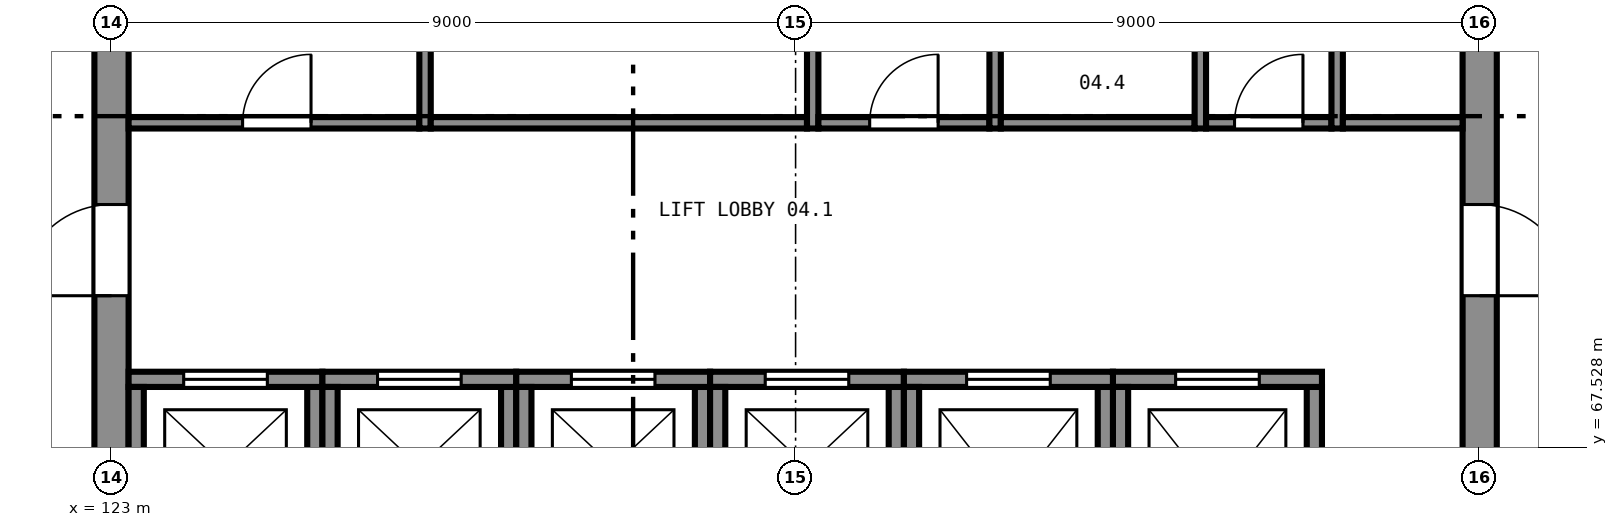
"""IFC4 building model, lengths in metres.
Left out: names, types, materials, properties, quantities, classifications, styles, units other than length and angle.
Written with IfcOpenShell. Run it as: python <this file> out.ifc"""

import sys

from ifc_helpers import new_model, si_unit, direction, frame, frame_2d, origin, place, context, subcontext, project, spatial, rectangle, extrude, element, fill, save


model = new_model("IFC4")
c1 = context("Model", 3, precision=1e-05, world=origin(), true_north=direction((0.0, 1.0)))
c2 = subcontext(c1, "Body", "Model", "MODEL_VIEW")
j1 = project(units=[si_unit("LENGTHUNIT", "METRE"), si_unit("PLANEANGLEUNIT", "RADIAN")], contexts=[c1])
p1 = place(None, origin())
s1 = spatial("IfcSite", under=j1, at=p1, CompositionType="ELEMENT")
p2 = place(p1, origin())
s2 = spatial("IfcBuilding", under=s1, at=p2, CompositionType="ELEMENT")
p3 = place(p2, frame((0.0, 0.0, 17.5)))
s3 = spatial("IfcBuildingStorey", under=s2, at=p3, CompositionType="ELEMENT", Elevation=17.5)
p4 = place(p3, frame((141.0, 65.225, 0.0), z_axis=(0.0, 0.0, 1.0), x_axis=(0.0, 1.0, 0.0)))
e1 = element("IfcWall", 1, at=p4, inside=s3, PredefinedType="SHEAR", context=c2, shape_type="SweptSolid", body=[
    extrude(rectangle(XDim=17.55, YDim=0.45, at=frame_2d((8.775, 0.0))), origin(), (0.0, 0.0, 1.0), 4.0),
])
p5 = place(p4, frame((4.3, 0.0, 0.0)))
e2 = element("IfcOpeningElement", 2, at=p5, cuts=e1, PredefinedType="OPENING", context=c2, shape_type="SweptSolid", body=[
    extrude(rectangle(XDim=1.2, YDim=2.1, at=frame_2d((0.6, 1.05))), frame((0.0, 0.235, 0.0), z_axis=(0.0, -1.0, 0.0), x_axis=(1.0, 0.0, 0.0)), (0.0, 0.0, 1.0), 0.47),
])
p6 = place(p4, frame((12.05, 0.0, 0.0)))
e3 = element("IfcOpeningElement", 3, at=p6, cuts=e1, PredefinedType="OPENING", context=c2, shape_type="SweptSolid", body=[
    extrude(rectangle(XDim=1.2, YDim=2.1, at=frame_2d((0.6, 1.05))), frame((0.0, 0.235, 0.0), z_axis=(0.0, -1.0, 0.0), x_axis=(1.0, 0.0, 0.0)), (0.0, 0.0, 1.0), 0.47),
])
p7 = place(p3, frame((123.0, 82.775, 0.0), z_axis=(0.0, 0.0, 1.0), x_axis=(0.0, -1.0, 0.0)))
e4 = element("IfcWall", 4, at=p7, inside=s3, PredefinedType="SHEAR", context=c2, shape_type="SweptSolid", body=[
    extrude(rectangle(XDim=17.55, YDim=0.45, at=frame_2d((8.775, 0.0))), origin(), (0.0, 0.0, 1.0), 4.0),
])
p8 = place(p7, frame((12.05, 0.0, 0.0)))
e5 = element("IfcOpeningElement", 5, at=p8, cuts=e4, PredefinedType="OPENING", context=c2, shape_type="SweptSolid", body=[
    extrude(rectangle(XDim=1.2, YDim=2.1, at=frame_2d((0.6, 1.05))), frame((0.0, 0.235, 0.0), z_axis=(0.0, -1.0, 0.0), x_axis=(1.0, 0.0, 0.0)), (0.0, 0.0, 1.0), 0.47),
])
p9 = place(p7, frame((4.3, 0.0, 0.0)))
e6 = element("IfcOpeningElement", 6, at=p9, cuts=e4, PredefinedType="OPENING", context=c2, shape_type="SweptSolid", body=[
    extrude(rectangle(XDim=1.2, YDim=2.1, at=frame_2d((0.6, 1.05))), frame((0.0, 0.235, 0.0), z_axis=(0.0, -1.0, 0.0), x_axis=(1.0, 0.0, 0.0)), (0.0, 0.0, 1.0), 0.47),
])
p10 = place(p3, frame((125.675, 66.225, 0.0), z_axis=(0.0, 0.0, 1.0), x_axis=(0.0, 1.0, 0.0)))
e7 = element("IfcWall", 7, at=p10, inside=s3, PredefinedType="SHEAR", context=c2, shape_type="SweptSolid", body=[
    extrude(rectangle(XDim=2.1, YDim=0.2, at=frame_2d((1.05, 0.0))), origin(), (0.0, 0.0, 1.0), 4.0),
])
p11 = place(p3, frame((125.775, 68.425, 0.0), z_axis=(0.0, 0.0, 1.0), x_axis=(-1.0, 0.0, 0.0)))
e8 = element("IfcWall", 8, at=p11, inside=s3, PredefinedType="SHEAR", context=c2, shape_type="SweptSolid", body=[
    extrude(rectangle(XDim=2.55, YDim=0.2, at=frame_2d((1.275, 0.0))), origin(), (0.0, 0.0, 1.0), 4.0),
])
p12 = place(p11, frame((0.725, 0.0, 0.0)))
e9 = element("IfcOpeningElement", 9, at=p12, cuts=e8, PredefinedType="OPENING", context=c2, shape_type="SweptSolid", body=[
    extrude(rectangle(XDim=1.1, YDim=2.1, at=frame_2d((0.55, 1.05))), frame((0.0, 0.11, 0.0), z_axis=(0.0, -1.0, 0.0), x_axis=(1.0, 0.0, 0.0)), (0.0, 0.0, 1.0), 0.22),
])
for number, where, z_axis, x_axis in (
    (10, (123.325, 68.325, 0.0), (0.0, 0.0, 1.0), (0.0, -1.0, 0.0)),
    (11, (128.225, 66.225, 0.0), (0.0, 0.0, 1.0), (0.0, 1.0, 0.0)),
):
    element("IfcWall", number, at=place(p3, frame(where, z_axis=z_axis, x_axis=x_axis)), inside=s3, PredefinedType="SHEAR", context=c2, shape_type="SweptSolid", body=[
        extrude(rectangle(XDim=2.1, YDim=0.2, at=frame_2d((1.05, 0.0))), origin(), (0.0, 0.0, 1.0), 4.0),
    ])
p13 = place(p3, frame((128.325, 68.425, 0.0), z_axis=(0.0, 0.0, 1.0), x_axis=(-1.0, 0.0, 0.0)))
e12 = element("IfcWall", 12, at=p13, inside=s3, PredefinedType="SHEAR", context=c2, shape_type="SweptSolid", body=[
    extrude(rectangle(XDim=2.55, YDim=0.2, at=frame_2d((1.275, 0.0))), origin(), (0.0, 0.0, 1.0), 4.0),
])
p14 = place(p13, frame((0.725, 0.0, 0.0)))
e13 = element("IfcOpeningElement", 13, at=p14, cuts=e12, PredefinedType="OPENING", context=c2, shape_type="SweptSolid", body=[
    extrude(rectangle(XDim=1.1, YDim=2.1, at=frame_2d((0.55, 1.05))), frame((0.0, 0.11, 0.0), z_axis=(0.0, -1.0, 0.0), x_axis=(1.0, 0.0, 0.0)), (0.0, 0.0, 1.0), 0.22),
])
for number, where, z_axis, x_axis in (
    (14, (125.875, 68.325, 0.0), (0.0, 0.0, 1.0), (0.0, -1.0, 0.0)),
    (15, (130.775, 66.225, 0.0), (0.0, 0.0, 1.0), (0.0, 1.0, 0.0)),
):
    element("IfcWall", number, at=place(p3, frame(where, z_axis=z_axis, x_axis=x_axis)), inside=s3, PredefinedType="SHEAR", context=c2, shape_type="SweptSolid", body=[
        extrude(rectangle(XDim=2.1, YDim=0.2, at=frame_2d((1.05, 0.0))), origin(), (0.0, 0.0, 1.0), 4.0),
    ])
p15 = place(p3, frame((130.875, 68.425, 0.0), z_axis=(0.0, 0.0, 1.0), x_axis=(-1.0, 0.0, 0.0)))
e16 = element("IfcWall", 16, at=p15, inside=s3, PredefinedType="SHEAR", context=c2, shape_type="SweptSolid", body=[
    extrude(rectangle(XDim=2.55, YDim=0.2, at=frame_2d((1.275, 0.0))), origin(), (0.0, 0.0, 1.0), 4.0),
])
p16 = place(p15, frame((0.725, 0.0, 0.0)))
e17 = element("IfcOpeningElement", 17, at=p16, cuts=e16, PredefinedType="OPENING", context=c2, shape_type="SweptSolid", body=[
    extrude(rectangle(XDim=1.1, YDim=2.1, at=frame_2d((0.55, 1.05))), frame((0.0, 0.11, 0.0), z_axis=(0.0, -1.0, 0.0), x_axis=(1.0, 0.0, 0.0)), (0.0, 0.0, 1.0), 0.22),
])
for number, where, z_axis, x_axis in (
    (18, (128.425, 68.325, 0.0), (0.0, 0.0, 1.0), (0.0, -1.0, 0.0)),
    (19, (133.325, 66.225, 0.0), (0.0, 0.0, 1.0), (0.0, 1.0, 0.0)),
):
    element("IfcWall", number, at=place(p3, frame(where, z_axis=z_axis, x_axis=x_axis)), inside=s3, PredefinedType="SHEAR", context=c2, shape_type="SweptSolid", body=[
        extrude(rectangle(XDim=2.1, YDim=0.2, at=frame_2d((1.05, 0.0))), origin(), (0.0, 0.0, 1.0), 4.0),
    ])
p17 = place(p3, frame((133.425, 68.425, 0.0), z_axis=(0.0, 0.0, 1.0), x_axis=(-1.0, 0.0, 0.0)))
e20 = element("IfcWall", 20, at=p17, inside=s3, PredefinedType="SHEAR", context=c2, shape_type="SweptSolid", body=[
    extrude(rectangle(XDim=2.55, YDim=0.2, at=frame_2d((1.275, 0.0))), origin(), (0.0, 0.0, 1.0), 4.0),
])
p18 = place(p17, frame((0.725, 0.0, 0.0)))
e21 = element("IfcOpeningElement", 21, at=p18, cuts=e20, PredefinedType="OPENING", context=c2, shape_type="SweptSolid", body=[
    extrude(rectangle(XDim=1.1, YDim=2.1, at=frame_2d((0.55, 1.05))), frame((0.0, 0.11, 0.0), z_axis=(0.0, -1.0, 0.0), x_axis=(1.0, 0.0, 0.0)), (0.0, 0.0, 1.0), 0.22),
])
p19 = place(p3, frame((130.975, 68.325, 0.0), z_axis=(0.0, 0.0, 1.0), x_axis=(0.0, -1.0, 0.0)))
e22 = element("IfcWall", 22, at=p19, inside=s3, PredefinedType="SHEAR", context=c2, shape_type="SweptSolid", body=[
    extrude(rectangle(XDim=2.1, YDim=0.2, at=frame_2d((1.05, 0.0))), origin(), (0.0, 0.0, 1.0), 4.0),
])
p20 = place(p3, frame((136.075, 65.425, 0.0), z_axis=(0.0, 0.0, 1.0), x_axis=(0.0, 1.0, 0.0)))
e23 = element("IfcWall", 23, at=p20, inside=s3, PredefinedType="SHEAR", context=c2, shape_type="SweptSolid", body=[
    extrude(rectangle(XDim=2.9, YDim=0.2, at=frame_2d((1.45, 0.0))), origin(), (0.0, 0.0, 1.0), 4.0),
])
p21 = place(p3, frame((136.175, 68.425, 0.0), z_axis=(0.0, 0.0, 1.0), x_axis=(-1.0, 0.0, 0.0)))
e24 = element("IfcWall", 24, at=p21, inside=s3, PredefinedType="SHEAR", context=c2, shape_type="SweptSolid", body=[
    extrude(rectangle(XDim=2.75, YDim=0.2, at=frame_2d((1.375, 0.0))), origin(), (0.0, 0.0, 1.0), 4.0),
])
p22 = place(p21, frame((0.825, 0.0, 0.0)))
e25 = element("IfcOpeningElement", 25, at=p22, cuts=e24, PredefinedType="OPENING", context=c2, shape_type="SweptSolid", body=[
    extrude(rectangle(XDim=1.1, YDim=2.1, at=frame_2d((0.55, 1.05))), frame((0.0, 0.11, 0.0), z_axis=(0.0, -1.0, 0.0), x_axis=(1.0, 0.0, 0.0)), (0.0, 0.0, 1.0), 0.22),
])
for number, where, z_axis, x_axis in (
    (26, (133.525, 68.325, 0.0), (0.0, 0.0, 1.0), (0.0, -1.0, 0.0)),
    (27, (138.825, 65.425, 0.0), (0.0, 0.0, 1.0), (0.0, 1.0, 0.0)),
):
    element("IfcWall", number, at=place(p3, frame(where, z_axis=z_axis, x_axis=x_axis)), inside=s3, PredefinedType="SHEAR", context=c2, shape_type="SweptSolid", body=[
        extrude(rectangle(XDim=2.9, YDim=0.2, at=frame_2d((1.45, 0.0))), origin(), (0.0, 0.0, 1.0), 4.0),
    ])
p23 = place(p3, frame((138.925, 68.425, 0.0), z_axis=(0.0, 0.0, 1.0), x_axis=(-1.0, 0.0, 0.0)))
e28 = element("IfcWall", 28, at=p23, inside=s3, PredefinedType="SHEAR", context=c2, shape_type="SweptSolid", body=[
    extrude(rectangle(XDim=2.75, YDim=0.2, at=frame_2d((1.375, 0.0))), origin(), (0.0, 0.0, 1.0), 4.0),
])
p24 = place(p23, frame((0.825, 0.0, 0.0)))
e29 = element("IfcOpeningElement", 29, at=p24, cuts=e28, PredefinedType="OPENING", context=c2, shape_type="SweptSolid", body=[
    extrude(rectangle(XDim=1.1, YDim=2.1, at=frame_2d((0.55, 1.05))), frame((0.0, 0.11, 0.0), z_axis=(0.0, -1.0, 0.0), x_axis=(1.0, 0.0, 0.0)), (0.0, 0.0, 1.0), 0.22),
])
p25 = place(p3, frame((136.275, 68.325, 0.0), z_axis=(0.0, 0.0, 1.0), x_axis=(0.0, -1.0, 0.0)))
e30 = element("IfcWall", 30, at=p25, inside=s3, PredefinedType="SHEAR", context=c2, shape_type="SweptSolid", body=[
    extrude(rectangle(XDim=2.9, YDim=0.2, at=frame_2d((1.45, 0.0))), origin(), (0.0, 0.0, 1.0), 4.0),
])
p26 = place(p3, frame((127.125, 71.725, 0.0), z_axis=(0.0, 0.0, 1.0), x_axis=(0.0, 1.0, 0.0)))
e31 = element("IfcWall", 31, at=p26, inside=s3, PredefinedType="PARTITIONING", context=c2, shape_type="SweptSolid", body=[
    extrude(rectangle(XDim=4.55, YDim=0.15, at=frame_2d((2.275, 0.0))), origin(), (0.0, 0.0, 1.0), 3.75),
])
p27 = place(p3, frame((123.225, 71.8, 0.0), z_axis=(0.0, 0.0, 1.0), x_axis=(1.0, 0.0, 0.0)))
e32 = element("IfcWall", 32, at=p27, inside=s3, PredefinedType="PARTITIONING", context=c2, shape_type="SweptSolid", body=[
    extrude(rectangle(XDim=3.825, YDim=0.15, at=frame_2d((1.913, 0.0))), origin(), (0.0, 0.0, 1.0), 3.75),
])
p28 = place(p27, frame((1.5, 0.0, 0.0)))
e33 = element("IfcOpeningElement", 33, at=p28, cuts=e32, PredefinedType="OPENING", context=c2, shape_type="SweptSolid", body=[
    extrude(rectangle(XDim=0.9, YDim=2.1, at=frame_2d((0.45, 1.05))), frame((0.0, 0.085, 0.0), z_axis=(0.0, -1.0, 0.0), x_axis=(1.0, 0.0, 0.0)), (0.0, 0.0, 1.0), 0.17),
])
p29 = place(p3, frame((132.225, 71.725, 0.0), z_axis=(0.0, 0.0, 1.0), x_axis=(0.0, 1.0, 0.0)))
e34 = element("IfcWall", 34, at=p29, inside=s3, PredefinedType="PARTITIONING", context=c2, shape_type="SweptSolid", body=[
    extrude(rectangle(XDim=4.55, YDim=0.15, at=frame_2d((2.275, 0.0))), origin(), (0.0, 0.0, 1.0), 3.75),
])
p30 = place(p3, frame((127.2, 71.8, 0.0), z_axis=(0.0, 0.0, 1.0), x_axis=(1.0, 0.0, 0.0)))
e35 = element("IfcWall", 35, at=p30, inside=s3, PredefinedType="PARTITIONING", context=c2, shape_type="SweptSolid", body=[
    extrude(rectangle(XDim=4.95, YDim=0.15, at=frame_2d((2.475, 0.0))), origin(), (0.0, 0.0, 1.0), 3.75),
])
p31 = place(p3, frame((134.625, 71.725, 0.0), z_axis=(0.0, 0.0, 1.0), x_axis=(0.0, 1.0, 0.0)))
e36 = element("IfcWall", 36, at=p31, inside=s3, PredefinedType="PARTITIONING", context=c2, shape_type="SweptSolid", body=[
    extrude(rectangle(XDim=4.55, YDim=0.15, at=frame_2d((2.275, 0.0))), origin(), (0.0, 0.0, 1.0), 3.75),
])
p32 = place(p3, frame((132.3, 71.8, 0.0), z_axis=(0.0, 0.0, 1.0), x_axis=(1.0, 0.0, 0.0)))
e37 = element("IfcWall", 37, at=p32, inside=s3, PredefinedType="PARTITIONING", context=c2, shape_type="SweptSolid", body=[
    extrude(rectangle(XDim=2.25, YDim=0.15, at=frame_2d((1.125, 0.0))), origin(), (0.0, 0.0, 1.0), 3.75),
])
p33 = place(p32, frame((0.675, 0.0, 0.0)))
e38 = element("IfcOpeningElement", 38, at=p33, cuts=e37, PredefinedType="OPENING", context=c2, shape_type="SweptSolid", body=[
    extrude(rectangle(XDim=0.9, YDim=2.1, at=frame_2d((0.45, 1.05))), frame((0.0, 0.085, 0.0), z_axis=(0.0, -1.0, 0.0), x_axis=(1.0, 0.0, 0.0)), (0.0, 0.0, 1.0), 0.17),
])
p34 = place(p3, frame((137.325, 71.725, 0.0), z_axis=(0.0, 0.0, 1.0), x_axis=(0.0, 1.0, 0.0)))
e39 = element("IfcWall", 39, at=p34, inside=s3, PredefinedType="PARTITIONING", context=c2, shape_type="SweptSolid", body=[
    extrude(rectangle(XDim=4.55, YDim=0.15, at=frame_2d((2.275, 0.0))), origin(), (0.0, 0.0, 1.0), 3.75),
])
p35 = place(p3, frame((134.7, 71.8, 0.0), z_axis=(0.0, 0.0, 1.0), x_axis=(1.0, 0.0, 0.0)))
e40 = element("IfcWall", 40, at=p35, inside=s3, PredefinedType="PARTITIONING", context=c2, shape_type="SweptSolid", body=[
    extrude(rectangle(XDim=2.55, YDim=0.15, at=frame_2d((1.275, 0.0))), origin(), (0.0, 0.0, 1.0), 3.75),
])
p36 = place(p3, frame((139.125, 71.725, 0.0), z_axis=(0.0, 0.0, 1.0), x_axis=(0.0, 1.0, 0.0)))
e41 = element("IfcWall", 41, at=p36, inside=s3, PredefinedType="PARTITIONING", context=c2, shape_type="SweptSolid", body=[
    extrude(rectangle(XDim=4.55, YDim=0.15, at=frame_2d((2.275, 0.0))), origin(), (0.0, 0.0, 1.0), 3.75),
])
p37 = place(p3, frame((137.4, 71.8, 0.0), z_axis=(0.0, 0.0, 1.0), x_axis=(1.0, 0.0, 0.0)))
e42 = element("IfcWall", 42, at=p37, inside=s3, PredefinedType="PARTITIONING", context=c2, shape_type="SweptSolid", body=[
    extrude(rectangle(XDim=1.65, YDim=0.15, at=frame_2d((0.825, 0.0))), origin(), (0.0, 0.0, 1.0), 3.75),
])
p38 = place(p37, frame((0.375, 0.0, 0.0)))
e43 = element("IfcOpeningElement", 43, at=p38, cuts=e42, PredefinedType="OPENING", context=c2, shape_type="SweptSolid", body=[
    extrude(rectangle(XDim=0.9, YDim=2.1, at=frame_2d((0.45, 1.05))), frame((0.0, 0.085, 0.0), z_axis=(0.0, -1.0, 0.0), x_axis=(1.0, 0.0, 0.0)), (0.0, 0.0, 1.0), 0.17),
])
p39 = place(p3, frame((139.2, 71.8, 0.0), z_axis=(0.0, 0.0, 1.0), x_axis=(1.0, 0.0, 0.0)))
e44 = element("IfcWall", 44, at=p39, inside=s3, PredefinedType="PARTITIONING", context=c2, shape_type="SweptSolid", body=[
    extrude(rectangle(XDim=1.575, YDim=0.15, at=frame_2d((0.788, 0.0))), origin(), (0.0, 0.0, 1.0), 3.75),
])
p40 = place(p12, origin())
e45 = element("IfcDoor", 45, at=p40, inside=s3, OperationType="SLIDING_TO_LEFT", PredefinedType="DOOR", context=c2, shape_type="SweptSolid", body=[
    extrude(rectangle(XDim=1.1, YDim=2.1, at=frame_2d((0.55, 1.05))), frame((0.0, 0.025, 0.0), z_axis=(0.0, -1.0, 0.0), x_axis=(1.0, 0.0, 0.0)), (0.0, 0.0, 1.0), 0.05),
])
fill(e9, e45)
p41 = place(p14, origin())
e46 = element("IfcDoor", 46, at=p41, inside=s3, OperationType="SLIDING_TO_LEFT", PredefinedType="DOOR", context=c2, shape_type="SweptSolid", body=[
    extrude(rectangle(XDim=1.1, YDim=2.1, at=frame_2d((0.55, 1.05))), frame((0.0, 0.025, 0.0), z_axis=(0.0, -1.0, 0.0), x_axis=(1.0, 0.0, 0.0)), (0.0, 0.0, 1.0), 0.05),
])
fill(e13, e46)
p42 = place(p16, origin())
e47 = element("IfcDoor", 47, at=p42, inside=s3, OperationType="SLIDING_TO_LEFT", PredefinedType="DOOR", context=c2, shape_type="SweptSolid", body=[
    extrude(rectangle(XDim=1.1, YDim=2.1, at=frame_2d((0.55, 1.05))), frame((0.0, 0.025, 0.0), z_axis=(0.0, -1.0, 0.0), x_axis=(1.0, 0.0, 0.0)), (0.0, 0.0, 1.0), 0.05),
])
fill(e17, e47)
p43 = place(p18, origin())
e48 = element("IfcDoor", 48, at=p43, inside=s3, OperationType="SLIDING_TO_LEFT", PredefinedType="DOOR", context=c2, shape_type="SweptSolid", body=[
    extrude(rectangle(XDim=1.1, YDim=2.1, at=frame_2d((0.55, 1.05))), frame((0.0, 0.025, 0.0), z_axis=(0.0, -1.0, 0.0), x_axis=(1.0, 0.0, 0.0)), (0.0, 0.0, 1.0), 0.05),
])
fill(e21, e48)
p44 = place(p22, origin())
e49 = element("IfcDoor", 49, at=p44, inside=s3, OperationType="SLIDING_TO_LEFT", PredefinedType="DOOR", context=c2, shape_type="SweptSolid", body=[
    extrude(rectangle(XDim=1.1, YDim=2.1, at=frame_2d((0.55, 1.05))), frame((0.0, 0.025, 0.0), z_axis=(0.0, -1.0, 0.0), x_axis=(1.0, 0.0, 0.0)), (0.0, 0.0, 1.0), 0.05),
])
fill(e25, e49)
p45 = place(p24, origin())
e50 = element("IfcDoor", 50, at=p45, inside=s3, OperationType="SLIDING_TO_LEFT", PredefinedType="DOOR", context=c2, shape_type="SweptSolid", body=[
    extrude(rectangle(XDim=1.1, YDim=2.1, at=frame_2d((0.55, 1.05))), frame((0.0, 0.025, 0.0), z_axis=(0.0, -1.0, 0.0), x_axis=(1.0, 0.0, 0.0)), (0.0, 0.0, 1.0), 0.05),
])
fill(e29, e50)
p46 = place(p8, frame((1.2, 0.0, 0.0), z_axis=(0.0, 0.0, 1.0), x_axis=(-1.0, 0.0, 0.0)))
e51 = element("IfcDoor", 51, at=p46, inside=s3, OperationType="SINGLE_SWING_RIGHT", PredefinedType="DOOR", context=c2, shape_type="SweptSolid", body=[
    extrude(rectangle(XDim=1.2, YDim=2.1, at=frame_2d((0.6, 1.05))), frame((0.0, 0.025, 0.0), z_axis=(0.0, -1.0, 0.0), x_axis=(1.0, 0.0, 0.0)), (0.0, 0.0, 1.0), 0.05),
])
fill(e5, e51)
p47 = place(p5, frame((1.2, 0.0, 0.0), z_axis=(0.0, 0.0, 1.0), x_axis=(-1.0, 0.0, 0.0)))
e52 = element("IfcDoor", 52, at=p47, inside=s3, OperationType="SINGLE_SWING_LEFT", PredefinedType="DOOR", context=c2, shape_type="SweptSolid", body=[
    extrude(rectangle(XDim=1.2, YDim=2.1, at=frame_2d((0.6, 1.05))), frame((0.0, 0.025, 0.0), z_axis=(0.0, -1.0, 0.0), x_axis=(1.0, 0.0, 0.0)), (0.0, 0.0, 1.0), 0.05),
])
fill(e2, e52)
p48 = place(p28, origin())
e53 = element("IfcDoor", 53, at=p48, inside=s3, OperationType="SINGLE_SWING_LEFT", PredefinedType="DOOR", context=c2, shape_type="SweptSolid", body=[
    extrude(rectangle(XDim=0.9, YDim=2.1, at=frame_2d((0.45, 1.05))), frame((0.0, 0.025, 0.0), z_axis=(0.0, -1.0, 0.0), x_axis=(1.0, 0.0, 0.0)), (0.0, 0.0, 1.0), 0.05),
])
fill(e33, e53)
p49 = place(p33, origin())
e54 = element("IfcDoor", 54, at=p49, inside=s3, OperationType="SINGLE_SWING_LEFT", PredefinedType="DOOR", context=c2, shape_type="SweptSolid", body=[
    extrude(rectangle(XDim=0.9, YDim=2.1, at=frame_2d((0.45, 1.05))), frame((0.0, 0.025, 0.0), z_axis=(0.0, -1.0, 0.0), x_axis=(1.0, 0.0, 0.0)), (0.0, 0.0, 1.0), 0.05),
])
fill(e38, e54)
p50 = place(p38, origin())
e55 = element("IfcDoor", 55, at=p50, inside=s3, OperationType="SINGLE_SWING_LEFT", PredefinedType="DOOR", context=c2, shape_type="SweptSolid", body=[
    extrude(rectangle(XDim=0.9, YDim=2.1, at=frame_2d((0.45, 1.05))), frame((0.0, 0.025, 0.0), z_axis=(0.0, -1.0, 0.0), x_axis=(1.0, 0.0, 0.0)), (0.0, 0.0, 1.0), 0.05),
])
fill(e43, e55)
save(model, sys.argv[1])
